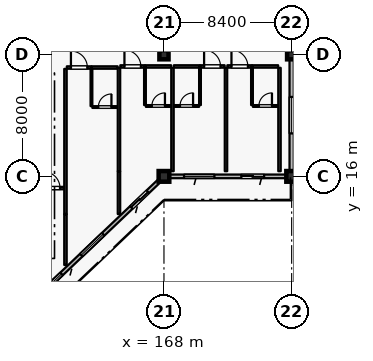
"""IFC4 building model, lengths in metres.
Left out: names, types, materials, properties, quantities, classifications, styles, units other than length and angle.
Written with IfcOpenShell. Run it as: python <this file> out.ifc"""

import sys

from ifc_helpers import new_model, si_unit, direction, frame, frame_2d, origin, origin_2d, place, context, subcontext, project, spatial, rectangle, extrude, element, fill, save


model = new_model("IFC4")
c1 = context("Model", 3, precision=1e-05, world=origin(), true_north=direction((0.0, 1.0)))
c2 = subcontext(c1, "Body", "Model", "MODEL_VIEW")
j1 = project(units=[si_unit("LENGTHUNIT", "METRE"), si_unit("PLANEANGLEUNIT", "RADIAN")], contexts=[c1])
p1 = place(None, origin())
s1 = spatial("IfcSite", under=j1, at=p1, CompositionType="ELEMENT")
p2 = place(p1, origin())
s2 = spatial("IfcBuilding", under=s1, at=p2, CompositionType="ELEMENT")
p3 = place(p2, frame((0.0, 0.0, 32.4)))
s3 = spatial("IfcBuildingStorey", under=s2, at=p3, CompositionType="ELEMENT", Elevation=32.4)
for number, where, z_axis, x_axis in (
    (1, (168.0, 16.0, 0.0), (0.0, 0.0, 1.0), (1.0, 0.0, 0.0)),
    (2, (176.4, 16.0, 0.0), (0.0, 0.0, 1.0), (1.0, 0.0, 0.0)),
):
    element("IfcColumn", number, at=place(p3, frame(where, z_axis=z_axis, x_axis=x_axis)), inside=s3, PredefinedType="COLUMN", context=c2, shape_type="SweptSolid", body=[
        extrude(rectangle(XDim=0.7, YDim=0.7, at=origin_2d()), origin(), (0.0, 0.0, 1.0), 3.6),
    ])
for number, where, z_axis, x_axis in (
    (3, (168.0, 24.0, 0.0), (0.0, 0.0, 1.0), (1.0, 0.0, 0.0)),
    (4, (176.4, 24.0, 0.0), (0.0, 0.0, 1.0), (1.0, 0.0, 0.0)),
):
    element("IfcColumn", number, at=place(p3, frame(where, z_axis=z_axis, x_axis=x_axis)), inside=s3, PredefinedType="COLUMN", context=c2, shape_type="SweptSolid", body=[
        extrude(rectangle(XDim=0.6, YDim=0.6, at=origin_2d()), origin(), (0.0, 0.0, 1.0), 3.6),
    ])
p4 = place(p3, frame((167.65, 15.667, 0.0), z_axis=(0.0, 0.0, 1.0), x_axis=(-0.724105170588, -0.689689569247, 0.0)))
e5 = element("IfcWall", 5, at=p4, inside=s3, PredefinedType="SOLIDWALL", context=c2, shape_type="SweptSolid", body=[
    extrude(rectangle(XDim=10.634, YDim=0.24, at=frame_2d((5.317, 0.0))), origin(), (0.0, 0.0, 1.0), 2.89),
])
p5 = place(p4, frame((0.983, 0.0, 0.0)))
e6 = element("IfcOpeningElement", 6, at=p5, cuts=e5, PredefinedType="OPENING", context=c2, shape_type="SweptSolid", body=[
    extrude(rectangle(XDim=1.5, YDim=2.25, at=frame_2d((0.75, 1.125))), frame((0.0, 0.13, 0.0), z_axis=(0.0, -1.0, 0.0), x_axis=(1.0, 0.0, 0.0)), (0.0, 0.0, 1.0), 0.26),
])
p6 = place(p4, frame((5.035, 0.0, 0.8)))
e7 = element("IfcOpeningElement", 7, at=p6, cuts=e5, PredefinedType="OPENING", context=c2, shape_type="SweptSolid", body=[
    extrude(rectangle(XDim=2.0, YDim=1.75, at=frame_2d((1.0, 0.875))), frame((0.0, 0.13, 0.0), z_axis=(0.0, -1.0, 0.0), x_axis=(1.0, 0.0, 0.0)), (0.0, 0.0, 1.0), 0.26),
])
p7 = place(p4, frame((8.819, 0.0, 0.8)))
e8 = element("IfcOpeningElement", 8, at=p7, cuts=e5, PredefinedType="OPENING", context=c2, shape_type="SweptSolid", body=[
    extrude(rectangle(XDim=1.6, YDim=1.6, at=frame_2d((0.8, 0.8))), frame((0.0, 0.13, 0.0), z_axis=(0.0, -1.0, 0.0), x_axis=(1.0, 0.0, 0.0)), (0.0, 0.0, 1.0), 0.26),
])
p8 = place(p3, frame((176.05, 16.0, 0.0), z_axis=(0.0, 0.0, 1.0), x_axis=(-1.0, 0.0, 0.0)))
e9 = element("IfcWall", 9, at=p8, inside=s3, PredefinedType="SOLIDWALL", context=c2, shape_type="SweptSolid", body=[
    extrude(rectangle(XDim=7.7, YDim=0.24, at=frame_2d((3.85, 0.0))), origin(), (0.0, 0.0, 1.0), 2.89),
])
p9 = place(p8, frame((1.46, 0.0, 0.0)))
e10 = element("IfcOpeningElement", 10, at=p9, cuts=e9, PredefinedType="OPENING", context=c2, shape_type="SweptSolid", body=[
    extrude(rectangle(XDim=1.5, YDim=2.25, at=frame_2d((0.75, 1.125))), frame((0.0, 0.13, 0.0), z_axis=(0.0, -1.0, 0.0), x_axis=(1.0, 0.0, 0.0)), (0.0, 0.0, 1.0), 0.26),
])
p10 = place(p8, frame((4.73, 0.0, 0.8)))
e11 = element("IfcOpeningElement", 11, at=p10, cuts=e9, PredefinedType="OPENING", context=c2, shape_type="SweptSolid", body=[
    extrude(rectangle(XDim=2.0, YDim=1.75, at=frame_2d((1.0, 0.875))), frame((0.0, 0.13, 0.0), z_axis=(0.0, -1.0, 0.0), x_axis=(1.0, 0.0, 0.0)), (0.0, 0.0, 1.0), 0.26),
])
p11 = place(p3, frame((176.4, 23.7, 0.0), z_axis=(0.0, 0.0, 1.0), x_axis=(0.0, -1.0, 0.0)))
e12 = element("IfcWall", 12, at=p11, inside=s3, PredefinedType="SOLIDWALL", context=c2, shape_type="SweptSolid", body=[
    extrude(rectangle(XDim=7.35, YDim=0.28, at=frame_2d((3.675, 0.0))), origin(), (0.0, 0.0, 1.0), 2.7),
])
p12 = place(p11, frame((2.475, 0.0, 0.5)))
e13 = element("IfcOpeningElement", 13, at=p12, cuts=e12, PredefinedType="OPENING", context=c2, shape_type="SweptSolid", body=[
    extrude(rectangle(XDim=2.4, YDim=1.65, at=frame_2d((1.2, 0.825))), frame((0.0, 0.15, 0.0), z_axis=(0.0, -1.0, 0.0), x_axis=(1.0, 0.0, 0.0)), (0.0, 0.0, 1.0), 0.3),
])
p13 = place(p3, frame((159.81, 15.23, 0.0), z_axis=(0.0, 0.0, 1.0), x_axis=(1.0, 0.0, 0.0)))
e14 = element("IfcWall", 14, at=p13, inside=s3, PredefinedType="PARTITIONING", context=c2, shape_type="SweptSolid", body=[
    extrude(rectangle(XDim=1.62, YDim=0.16, at=frame_2d((0.81, 0.0))), origin(), (0.0, 0.0, 1.0), 3.335),
])
p14 = place(p13, frame((0.27, 0.0, 0.0)))
e15 = element("IfcOpeningElement", 15, at=p14, cuts=e14, PredefinedType="OPENING", context=c2, shape_type="SweptSolid", body=[
    extrude(rectangle(XDim=1.08, YDim=2.3, at=frame_2d((0.54, 1.15))), frame((0.0, 0.09, 0.0), z_axis=(0.0, -1.0, 0.0), x_axis=(1.0, 0.0, 0.0)), (0.0, 0.0, 1.0), 0.18),
])
p15 = place(p3, frame((161.52, 10.17, 0.0), z_axis=(0.0, 0.0, 1.0), x_axis=(0.0, 1.0, 0.0)))
e16 = element("IfcWall", 16, at=p15, inside=s3, PredefinedType="PARTITIONING", context=c2, shape_type="SweptSolid", body=[
    extrude(rectangle(XDim=3.34, YDim=0.16, at=frame_2d((1.67, 0.0))), origin(), (0.0, 0.0, 1.0), 3.335),
])
p16 = place(p3, frame((161.61, 23.16, 0.0), z_axis=(0.0, 0.0, 1.0), x_axis=(1.0, 0.0, 0.0)))
e17 = element("IfcWall", 17, at=p16, inside=s3, PredefinedType="PARTITIONING", context=c2, shape_type="SweptSolid", body=[
    extrude(rectangle(XDim=1.62, YDim=0.16, at=frame_2d((0.81, 0.0))), origin(), (0.0, 0.0, 1.0), 3.335),
])
p17 = place(p16, frame((0.27, 0.0, 0.0)))
e18 = element("IfcOpeningElement", 18, at=p17, cuts=e17, PredefinedType="OPENING", context=c2, shape_type="SweptSolid", body=[
    extrude(rectangle(XDim=1.08, YDim=2.3, at=frame_2d((0.54, 1.15))), frame((0.0, 0.09, 0.0), z_axis=(0.0, -1.0, 0.0), x_axis=(1.0, 0.0, 0.0)), (0.0, 0.0, 1.0), 0.18),
])
p18 = place(p3, frame((163.24, 23.16, 0.0), z_axis=(0.0, 0.0, 1.0), x_axis=(1.0, 0.0, 0.0)))
e19 = element("IfcWall", 19, at=p18, inside=s3, PredefinedType="PARTITIONING", context=c2, shape_type="SweptSolid", body=[
    extrude(rectangle(XDim=1.71, YDim=0.16, at=frame_2d((0.855, 0.0))), origin(), (0.0, 0.0, 1.0), 3.335),
])
p19 = place(p3, frame((163.23, 20.62, 0.0), z_axis=(0.0, 0.0, 1.0), x_axis=(0.0, 1.0, 0.0)))
e20 = element("IfcWall", 20, at=p19, inside=s3, PredefinedType="PARTITIONING", context=c2, shape_type="SweptSolid", body=[
    extrude(rectangle(XDim=2.45, YDim=0.115, at=frame_2d((1.225, 0.0))), origin(), (0.0, 0.0, 1.0), 3.335),
])
p20 = place(p3, frame((163.29, 20.56, 0.0), z_axis=(0.0, 0.0, 1.0), x_axis=(1.0, 0.0, 0.0)))
e21 = element("IfcWall", 21, at=p20, inside=s3, PredefinedType="PARTITIONING", context=c2, shape_type="SweptSolid", body=[
    extrude(rectangle(XDim=1.65, YDim=0.115, at=frame_2d((0.825, 0.0))), origin(), (0.0, 0.0, 1.0), 3.335),
])
p21 = place(p20, frame((0.395, 0.0, 0.0)))
e22 = element("IfcOpeningElement", 22, at=p21, cuts=e21, PredefinedType="OPENING", context=c2, shape_type="SweptSolid", body=[
    extrude(rectangle(XDim=0.86, YDim=2.12, at=frame_2d((0.43, 1.06))), frame((0.0, 0.067, 0.0), z_axis=(0.0, -1.0, 0.0), x_axis=(1.0, 0.0, 0.0)), (0.0, 0.0, 1.0), 0.135),
])
p22 = place(p3, frame((161.52, 13.52, 0.0), z_axis=(0.0, 0.0, 1.0), x_axis=(0.0, 1.0, 0.0)))
e23 = element("IfcWall", 23, at=p22, inside=s3, PredefinedType="PARTITIONING", context=c2, shape_type="SweptSolid", body=[
    extrude(rectangle(XDim=9.55, YDim=0.16, at=frame_2d((4.775, 0.0))), origin(), (0.0, 0.0, 1.0), 3.335),
])
p23 = place(p3, frame((165.04, 13.52, 0.0), z_axis=(0.0, 0.0, 1.0), x_axis=(0.0, 1.0, 0.0)))
e24 = element("IfcWall", 24, at=p23, inside=s3, PredefinedType="PARTITIONING", context=c2, shape_type="SweptSolid", body=[
    extrude(rectangle(XDim=2.81, YDim=0.16, at=frame_2d((1.405, 0.0))), origin(), (0.0, 0.0, 1.0), 3.335),
])
p24 = place(p3, frame((165.13, 23.23, 0.0), z_axis=(0.0, 0.0, 1.0), x_axis=(1.0, 0.0, 0.0)))
e25 = element("IfcWall", 25, at=p24, inside=s3, PredefinedType="PARTITIONING", context=c2, shape_type="SweptSolid", body=[
    extrude(rectangle(XDim=1.62, YDim=0.16, at=frame_2d((0.81, 0.0))), origin(), (0.0, 0.0, 1.0), 3.335),
])
p25 = place(p24, frame((0.27, 0.0, 0.0)))
e26 = element("IfcOpeningElement", 26, at=p25, cuts=e25, PredefinedType="OPENING", context=c2, shape_type="SweptSolid", body=[
    extrude(rectangle(XDim=1.08, YDim=2.3, at=frame_2d((0.54, 1.15))), frame((0.0, 0.09, 0.0), z_axis=(0.0, -1.0, 0.0), x_axis=(1.0, 0.0, 0.0)), (0.0, 0.0, 1.0), 0.18),
])
p26 = place(p3, frame((166.76, 23.23, 0.0), z_axis=(0.0, 0.0, 1.0), x_axis=(1.0, 0.0, 0.0)))
e27 = element("IfcWall", 27, at=p26, inside=s3, PredefinedType="PARTITIONING", context=c2, shape_type="SweptSolid", body=[
    extrude(rectangle(XDim=1.71, YDim=0.16, at=frame_2d((0.855, 0.0))), origin(), (0.0, 0.0, 1.0), 3.335),
])
p27 = place(p3, frame((166.75, 20.69, 0.0), z_axis=(0.0, 0.0, 1.0), x_axis=(0.0, 1.0, 0.0)))
e28 = element("IfcWall", 28, at=p27, inside=s3, PredefinedType="PARTITIONING", context=c2, shape_type="SweptSolid", body=[
    extrude(rectangle(XDim=2.45, YDim=0.115, at=frame_2d((1.225, 0.0))), origin(), (0.0, 0.0, 1.0), 3.335),
])
p28 = place(p3, frame((166.81, 20.63, 0.0), z_axis=(0.0, 0.0, 1.0), x_axis=(1.0, 0.0, 0.0)))
e29 = element("IfcWall", 29, at=p28, inside=s3, PredefinedType="PARTITIONING", context=c2, shape_type="SweptSolid", body=[
    extrude(rectangle(XDim=1.65, YDim=0.115, at=frame_2d((0.825, 0.0))), origin(), (0.0, 0.0, 1.0), 3.335),
])
p29 = place(p28, frame((0.395, 0.0, 0.0)))
e30 = element("IfcOpeningElement", 30, at=p29, cuts=e29, PredefinedType="OPENING", context=c2, shape_type="SweptSolid", body=[
    extrude(rectangle(XDim=0.86, YDim=2.12, at=frame_2d((0.43, 1.06))), frame((0.0, 0.067, 0.0), z_axis=(0.0, -1.0, 0.0), x_axis=(1.0, 0.0, 0.0)), (0.0, 0.0, 1.0), 0.135),
])
p30 = place(p3, frame((165.04, 16.34, 0.0), z_axis=(0.0, 0.0, 1.0), x_axis=(0.0, 1.0, 0.0)))
e31 = element("IfcWall", 31, at=p30, inside=s3, PredefinedType="PARTITIONING", context=c2, shape_type="SweptSolid", body=[
    extrude(rectangle(XDim=6.8, YDim=0.16, at=frame_2d((3.4, 0.0))), origin(), (0.0, 0.0, 1.0), 3.335),
])
p31 = place(p3, frame((168.65, 23.23, 0.0), z_axis=(0.0, 0.0, 1.0), x_axis=(1.0, 0.0, 0.0)))
e32 = element("IfcWall", 32, at=p31, inside=s3, PredefinedType="PARTITIONING", context=c2, shape_type="SweptSolid", body=[
    extrude(rectangle(XDim=1.71, YDim=0.16, at=frame_2d((0.855, 0.0))), origin(), (0.0, 0.0, 1.0), 3.335),
])
p32 = place(p3, frame((170.37, 23.23, 0.0), z_axis=(0.0, 0.0, 1.0), x_axis=(1.0, 0.0, 0.0)))
e33 = element("IfcWall", 33, at=p32, inside=s3, PredefinedType="PARTITIONING", context=c2, shape_type="SweptSolid", body=[
    extrude(rectangle(XDim=1.62, YDim=0.16, at=frame_2d((0.81, 0.0))), origin(), (0.0, 0.0, 1.0), 3.335),
])
p33 = place(p32, frame((0.27, 0.0, 0.0)))
e34 = element("IfcOpeningElement", 34, at=p33, cuts=e33, PredefinedType="OPENING", context=c2, shape_type="SweptSolid", body=[
    extrude(rectangle(XDim=1.08, YDim=2.3, at=frame_2d((0.54, 1.15))), frame((0.0, 0.09, 0.0), z_axis=(0.0, -1.0, 0.0), x_axis=(1.0, 0.0, 0.0)), (0.0, 0.0, 1.0), 0.18),
])
p34 = place(p3, frame((170.37, 20.69, 0.0), z_axis=(0.0, 0.0, 1.0), x_axis=(0.0, 1.0, 0.0)))
e35 = element("IfcWall", 35, at=p34, inside=s3, PredefinedType="PARTITIONING", context=c2, shape_type="SweptSolid", body=[
    extrude(rectangle(XDim=2.45, YDim=0.115, at=frame_2d((1.225, 0.0))), origin(), (0.0, 0.0, 1.0), 3.335),
])
p35 = place(p3, frame((168.66, 20.63, 0.0), z_axis=(0.0, 0.0, 1.0), x_axis=(1.0, 0.0, 0.0)))
e36 = element("IfcWall", 36, at=p35, inside=s3, PredefinedType="PARTITIONING", context=c2, shape_type="SweptSolid", body=[
    extrude(rectangle(XDim=1.65, YDim=0.115, at=frame_2d((0.825, 0.0))), origin(), (0.0, 0.0, 1.0), 3.335),
])
p36 = place(p35, frame((0.395, 0.0, 0.0)))
e37 = element("IfcOpeningElement", 37, at=p36, cuts=e36, PredefinedType="OPENING", context=c2, shape_type="SweptSolid", body=[
    extrude(rectangle(XDim=0.86, YDim=2.12, at=frame_2d((0.43, 1.06))), frame((0.0, 0.067, 0.0), z_axis=(0.0, -1.0, 0.0), x_axis=(1.0, 0.0, 0.0)), (0.0, 0.0, 1.0), 0.135),
])
p37 = place(p3, frame((168.56, 16.34, 0.0), z_axis=(0.0, 0.0, 1.0), x_axis=(0.0, 1.0, 0.0)))
e38 = element("IfcWall", 38, at=p37, inside=s3, PredefinedType="PARTITIONING", context=c2, shape_type="SweptSolid", body=[
    extrude(rectangle(XDim=6.8, YDim=0.16, at=frame_2d((3.4, 0.0))), origin(), (0.0, 0.0, 1.0), 3.335),
])
p38 = place(p3, frame((172.17, 23.23, 0.0), z_axis=(0.0, 0.0, 1.0), x_axis=(1.0, 0.0, 0.0)))
e39 = element("IfcWall", 39, at=p38, inside=s3, PredefinedType="PARTITIONING", context=c2, shape_type="SweptSolid", body=[
    extrude(rectangle(XDim=1.62, YDim=0.16, at=frame_2d((0.81, 0.0))), origin(), (0.0, 0.0, 1.0), 3.335),
])
p39 = place(p38, frame((0.27, 0.0, 0.0)))
e40 = element("IfcOpeningElement", 40, at=p39, cuts=e39, PredefinedType="OPENING", context=c2, shape_type="SweptSolid", body=[
    extrude(rectangle(XDim=1.08, YDim=2.3, at=frame_2d((0.54, 1.15))), frame((0.0, 0.09, 0.0), z_axis=(0.0, -1.0, 0.0), x_axis=(1.0, 0.0, 0.0)), (0.0, 0.0, 1.0), 0.18),
])
p40 = place(p3, frame((173.8, 23.23, 0.0), z_axis=(0.0, 0.0, 1.0), x_axis=(1.0, 0.0, 0.0)))
e41 = element("IfcWall", 41, at=p40, inside=s3, PredefinedType="PARTITIONING", context=c2, shape_type="SweptSolid", body=[
    extrude(rectangle(XDim=1.71, YDim=0.16, at=frame_2d((0.855, 0.0))), origin(), (0.0, 0.0, 1.0), 3.335),
])
p41 = place(p3, frame((173.79, 20.69, 0.0), z_axis=(0.0, 0.0, 1.0), x_axis=(0.0, 1.0, 0.0)))
e42 = element("IfcWall", 42, at=p41, inside=s3, PredefinedType="PARTITIONING", context=c2, shape_type="SweptSolid", body=[
    extrude(rectangle(XDim=2.45, YDim=0.115, at=frame_2d((1.225, 0.0))), origin(), (0.0, 0.0, 1.0), 3.335),
])
p42 = place(p3, frame((173.85, 20.63, 0.0), z_axis=(0.0, 0.0, 1.0), x_axis=(1.0, 0.0, 0.0)))
e43 = element("IfcWall", 43, at=p42, inside=s3, PredefinedType="PARTITIONING", context=c2, shape_type="SweptSolid", body=[
    extrude(rectangle(XDim=1.65, YDim=0.115, at=frame_2d((0.825, 0.0))), origin(), (0.0, 0.0, 1.0), 3.335),
])
p43 = place(p42, frame((0.395, 0.0, 0.0)))
e44 = element("IfcOpeningElement", 44, at=p43, cuts=e43, PredefinedType="OPENING", context=c2, shape_type="SweptSolid", body=[
    extrude(rectangle(XDim=0.86, YDim=2.12, at=frame_2d((0.43, 1.06))), frame((0.0, 0.067, 0.0), z_axis=(0.0, -1.0, 0.0), x_axis=(1.0, 0.0, 0.0)), (0.0, 0.0, 1.0), 0.135),
])
for number, where, z_axis, x_axis in (
    (45, (172.08, 16.34, 0.0), (0.0, 0.0, 1.0), (0.0, 1.0, 0.0)),
    (46, (175.6, 16.34, 0.0), (0.0, 0.0, 1.0), (0.0, 1.0, 0.0)),
):
    element("IfcWall", number, at=place(p3, frame(where, z_axis=z_axis, x_axis=x_axis)), inside=s3, PredefinedType="PARTITIONING", context=c2, shape_type="SweptSolid", body=[
        extrude(rectangle(XDim=6.8, YDim=0.16, at=frame_2d((3.4, 0.0))), origin(), (0.0, 0.0, 1.0), 3.335),
    ])
p44 = place(p5, origin())
e47 = element("IfcDoor", 47, at=p44, inside=s3, OperationType="SLIDING_TO_LEFT", PredefinedType="DOOR", context=c2, shape_type="SweptSolid", body=[
    extrude(rectangle(XDim=1.5, YDim=2.25, at=frame_2d((0.75, 1.125))), frame((0.0, 0.025, 0.0), z_axis=(0.0, -1.0, 0.0), x_axis=(1.0, 0.0, 0.0)), (0.0, 0.0, 1.0), 0.05),
])
fill(e6, e47)
p45 = place(p6, origin())
e48 = element("IfcWindow", 48, at=p45, inside=s3, PartitioningType="DOUBLE_PANEL_VERTICAL", PredefinedType="WINDOW", context=c2, shape_type="SweptSolid", body=[
    extrude(rectangle(XDim=2.0, YDim=1.75, at=frame_2d((1.0, 0.875))), frame((0.0, 0.03, 0.0), z_axis=(0.0, -1.0, 0.0), x_axis=(1.0, 0.0, 0.0)), (0.0, 0.0, 1.0), 0.06),
])
fill(e7, e48)
p46 = place(p7, origin())
e49 = element("IfcWindow", 49, at=p46, inside=s3, PartitioningType="SINGLE_PANEL", PredefinedType="WINDOW", context=c2, shape_type="SweptSolid", body=[
    extrude(rectangle(XDim=1.6, YDim=1.6, at=frame_2d((0.8, 0.8))), frame((0.0, 0.03, 0.0), z_axis=(0.0, -1.0, 0.0), x_axis=(1.0, 0.0, 0.0)), (0.0, 0.0, 1.0), 0.06),
])
fill(e8, e49)
p47 = place(p9, origin())
e50 = element("IfcDoor", 50, at=p47, inside=s3, OperationType="SLIDING_TO_LEFT", PredefinedType="DOOR", context=c2, shape_type="SweptSolid", body=[
    extrude(rectangle(XDim=1.5, YDim=2.25, at=frame_2d((0.75, 1.125))), frame((0.0, 0.025, 0.0), z_axis=(0.0, -1.0, 0.0), x_axis=(1.0, 0.0, 0.0)), (0.0, 0.0, 1.0), 0.05),
])
fill(e10, e50)
p48 = place(p10, origin())
e51 = element("IfcWindow", 51, at=p48, inside=s3, PartitioningType="DOUBLE_PANEL_VERTICAL", PredefinedType="WINDOW", context=c2, shape_type="SweptSolid", body=[
    extrude(rectangle(XDim=2.0, YDim=1.75, at=frame_2d((1.0, 0.875))), frame((0.0, 0.03, 0.0), z_axis=(0.0, -1.0, 0.0), x_axis=(1.0, 0.0, 0.0)), (0.0, 0.0, 1.0), 0.06),
])
fill(e11, e51)
p49 = place(p12, origin())
e52 = element("IfcWindow", 52, at=p49, inside=s3, PartitioningType="DOUBLE_PANEL_VERTICAL", PredefinedType="WINDOW", context=c2, shape_type="SweptSolid", body=[
    extrude(rectangle(XDim=2.4, YDim=1.65, at=frame_2d((1.2, 0.825))), frame((0.0, 0.03, 0.0), z_axis=(0.0, -1.0, 0.0), x_axis=(1.0, 0.0, 0.0)), (0.0, 0.0, 1.0), 0.06),
])
fill(e13, e52)
p50 = place(p14, origin())
e53 = element("IfcDoor", 53, at=p50, inside=s3, OperationType="SINGLE_SWING_LEFT", PredefinedType="DOOR", context=c2, shape_type="SweptSolid", body=[
    extrude(rectangle(XDim=1.08, YDim=2.3, at=frame_2d((0.54, 1.15))), frame((0.0, 0.025, 0.0), z_axis=(0.0, -1.0, 0.0), x_axis=(1.0, 0.0, 0.0)), (0.0, 0.0, 1.0), 0.05),
])
fill(e15, e53)
p51 = place(p17, origin())
e54 = element("IfcDoor", 54, at=p51, inside=s3, OperationType="SINGLE_SWING_LEFT", PredefinedType="DOOR", context=c2, shape_type="SweptSolid", body=[
    extrude(rectangle(XDim=1.08, YDim=2.3, at=frame_2d((0.54, 1.15))), frame((0.0, 0.025, 0.0), z_axis=(0.0, -1.0, 0.0), x_axis=(1.0, 0.0, 0.0)), (0.0, 0.0, 1.0), 0.05),
])
fill(e18, e54)
p52 = place(p21, origin())
e55 = element("IfcDoor", 55, at=p52, inside=s3, OperationType="SINGLE_SWING_RIGHT", PredefinedType="DOOR", context=c2, shape_type="SweptSolid", body=[
    extrude(rectangle(XDim=0.86, YDim=2.12, at=frame_2d((0.43, 1.06))), frame((0.0, 0.025, 0.0), z_axis=(0.0, -1.0, 0.0), x_axis=(1.0, 0.0, 0.0)), (0.0, 0.0, 1.0), 0.05),
])
fill(e22, e55)
p53 = place(p25, origin())
e56 = element("IfcDoor", 56, at=p53, inside=s3, OperationType="SINGLE_SWING_LEFT", PredefinedType="DOOR", context=c2, shape_type="SweptSolid", body=[
    extrude(rectangle(XDim=1.08, YDim=2.3, at=frame_2d((0.54, 1.15))), frame((0.0, 0.025, 0.0), z_axis=(0.0, -1.0, 0.0), x_axis=(1.0, 0.0, 0.0)), (0.0, 0.0, 1.0), 0.05),
])
fill(e26, e56)
p54 = place(p29, origin())
e57 = element("IfcDoor", 57, at=p54, inside=s3, OperationType="SINGLE_SWING_RIGHT", PredefinedType="DOOR", context=c2, shape_type="SweptSolid", body=[
    extrude(rectangle(XDim=0.86, YDim=2.12, at=frame_2d((0.43, 1.06))), frame((0.0, 0.025, 0.0), z_axis=(0.0, -1.0, 0.0), x_axis=(1.0, 0.0, 0.0)), (0.0, 0.0, 1.0), 0.05),
])
fill(e30, e57)
p55 = place(p33, origin())
e58 = element("IfcDoor", 58, at=p55, inside=s3, OperationType="SINGLE_SWING_LEFT", PredefinedType="DOOR", context=c2, shape_type="SweptSolid", body=[
    extrude(rectangle(XDim=1.08, YDim=2.3, at=frame_2d((0.54, 1.15))), frame((0.0, 0.025, 0.0), z_axis=(0.0, -1.0, 0.0), x_axis=(1.0, 0.0, 0.0)), (0.0, 0.0, 1.0), 0.05),
])
fill(e34, e58)
p56 = place(p36, origin())
e59 = element("IfcDoor", 59, at=p56, inside=s3, OperationType="SINGLE_SWING_RIGHT", PredefinedType="DOOR", context=c2, shape_type="SweptSolid", body=[
    extrude(rectangle(XDim=0.86, YDim=2.12, at=frame_2d((0.43, 1.06))), frame((0.0, 0.025, 0.0), z_axis=(0.0, -1.0, 0.0), x_axis=(1.0, 0.0, 0.0)), (0.0, 0.0, 1.0), 0.05),
])
fill(e37, e59)
p57 = place(p39, origin())
e60 = element("IfcDoor", 60, at=p57, inside=s3, OperationType="SINGLE_SWING_LEFT", PredefinedType="DOOR", context=c2, shape_type="SweptSolid", body=[
    extrude(rectangle(XDim=1.08, YDim=2.3, at=frame_2d((0.54, 1.15))), frame((0.0, 0.025, 0.0), z_axis=(0.0, -1.0, 0.0), x_axis=(1.0, 0.0, 0.0)), (0.0, 0.0, 1.0), 0.05),
])
fill(e40, e60)
p58 = place(p43, origin())
e61 = element("IfcDoor", 61, at=p58, inside=s3, OperationType="SINGLE_SWING_RIGHT", PredefinedType="DOOR", context=c2, shape_type="SweptSolid", body=[
    extrude(rectangle(XDim=0.86, YDim=2.12, at=frame_2d((0.43, 1.06))), frame((0.0, 0.025, 0.0), z_axis=(0.0, -1.0, 0.0), x_axis=(1.0, 0.0, 0.0)), (0.0, 0.0, 1.0), 0.05),
])
fill(e44, e61)
save(model, sys.argv[1])
